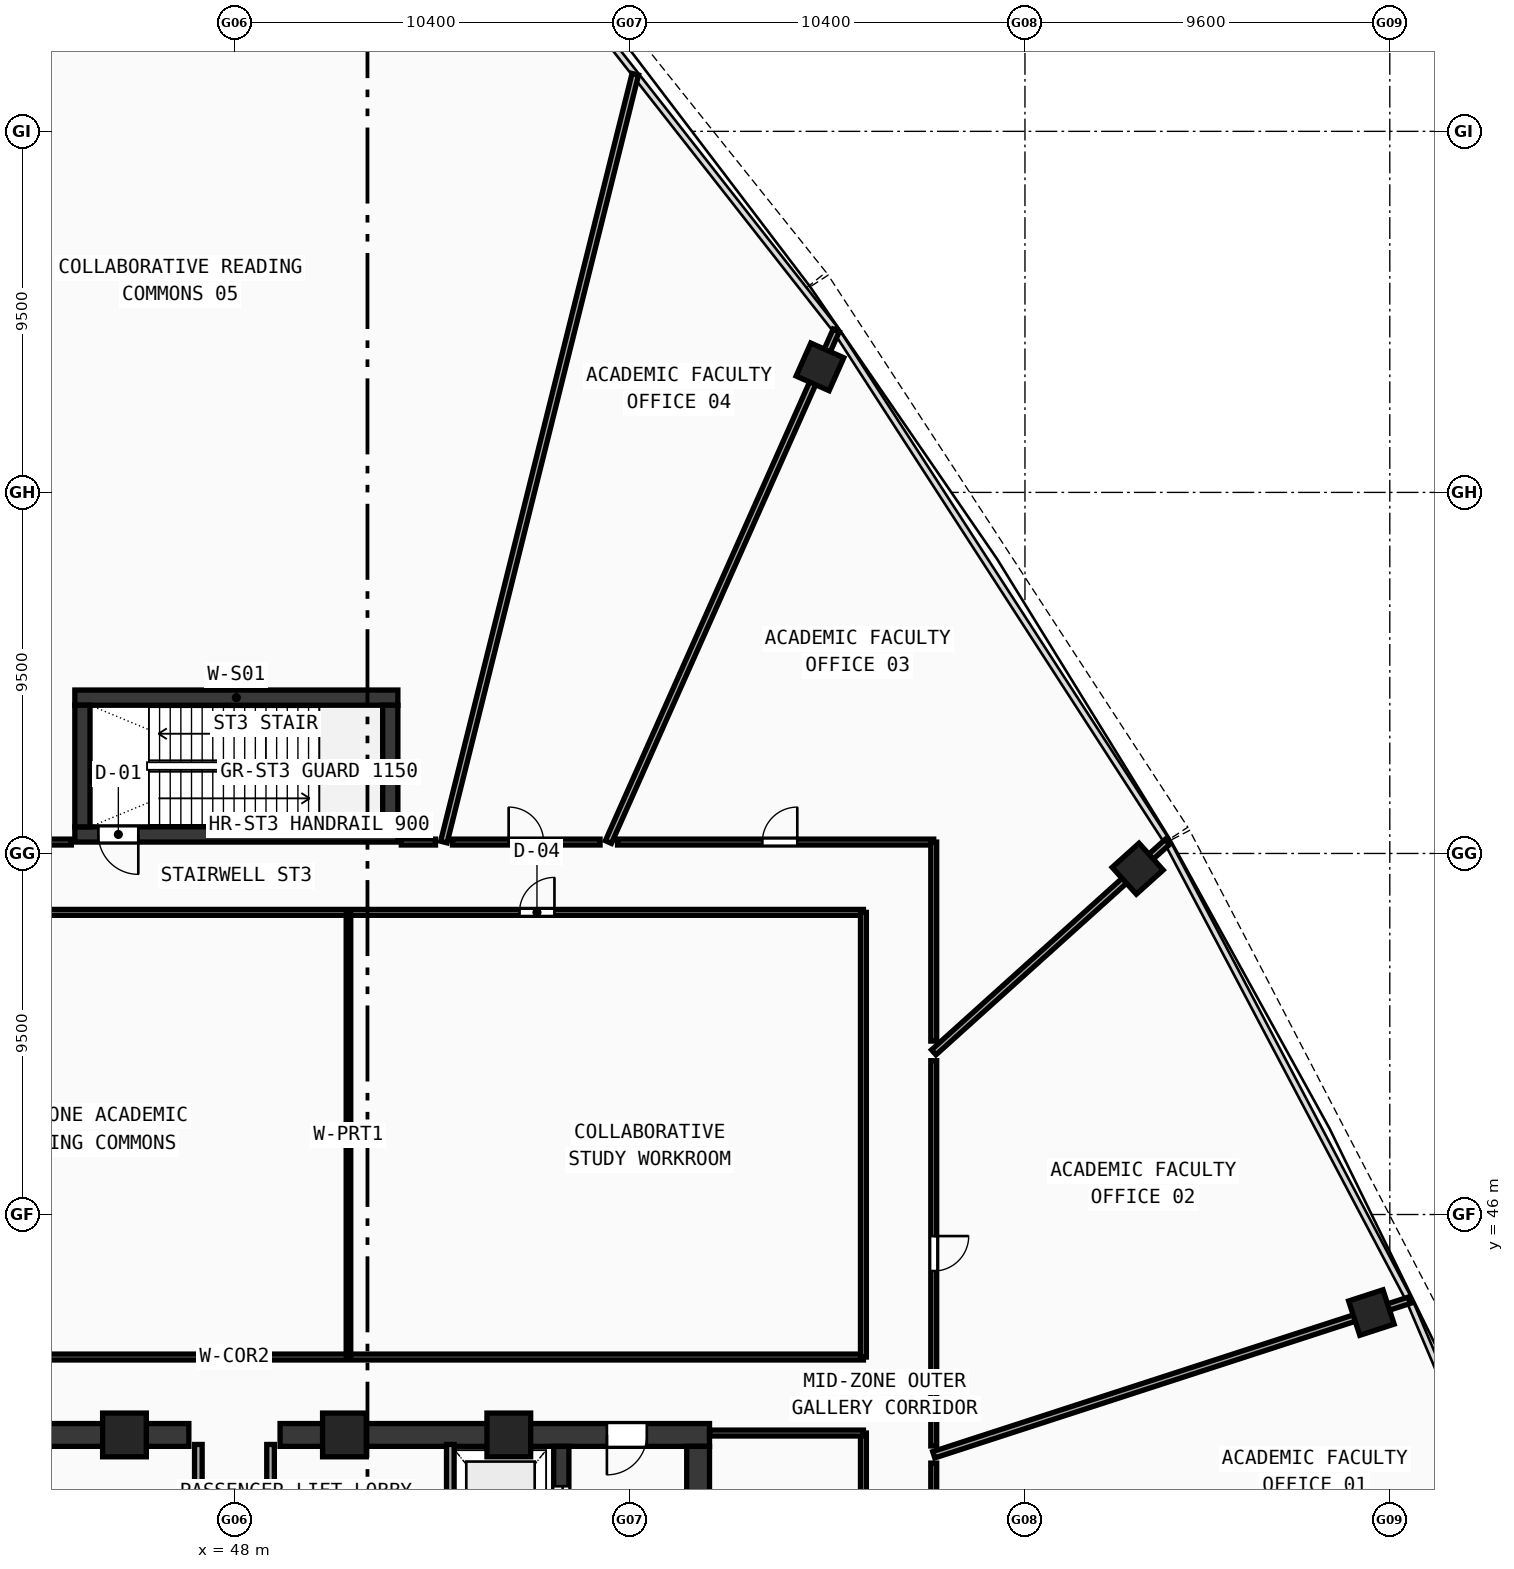
"""IFC4 building model, lengths in metres.
Left out: names, types, materials, properties, quantities, classifications, styles, units other than length and angle.
Written with IfcOpenShell. Run it as: python <this file> out.ifc"""

import sys

from ifc_helpers import new_model, si_unit, direction, frame, frame_2d, origin, origin_with_axes, origin_2d, place, context, subcontext, project, spatial, rectangle, hollow_rectangle, extrude, source, transform, mapped, element, fill, save


model = new_model("IFC4")
c1 = context("Model", 3, precision=1e-05, world=origin(), true_north=direction((0.0, 1.0)))
c2 = subcontext(c1, "Body", "Model", "MODEL_VIEW")
j1 = project(units=[si_unit("LENGTHUNIT", "METRE"), si_unit("PLANEANGLEUNIT", "RADIAN")], contexts=[c1])
p1 = place(None, origin())
s1 = spatial("IfcSite", under=j1, at=p1, CompositionType="ELEMENT")
p2 = place(p1, origin())
s2 = spatial("IfcBuilding", under=s1, at=p2, CompositionType="ELEMENT")
p3 = place(p2, frame((0.0, 0.0, 170.31)))
s3 = spatial("IfcBuildingStorey", under=s2, at=p3, CompositionType="ELEMENT", Elevation=170.31)
p4 = place(p3, frame((35.5, 40.2, 0.0), z_axis=(0.0, 0.0, 1.0), x_axis=(1.0, 0.0, 0.0)))
e1 = element("IfcWall", 1, at=p4, inside=s3, PredefinedType="SHEAR", context=c2, shape_type="SweptSolid", body=[
    extrude(rectangle(XDim=11.3, YDim=0.6, at=frame_2d((5.65, 0.0))), origin(), (0.0, 0.0, 1.0), 5.57),
])
p5 = place(p4, frame((1.65, 0.0, 0.0)))
e2 = element("IfcOpeningElement", 2, at=p5, cuts=e1, PredefinedType="OPENING", context=c2, shape_type="SweptSolid", body=[
    extrude(rectangle(XDim=1.05, YDim=2.1, at=frame_2d((0.525, 1.05))), frame((0.0, 0.31, 0.0), z_axis=(0.0, -1.0, 0.0), x_axis=(1.0, 0.0, 0.0)), (0.0, 0.0, 1.0), 0.62),
])
p6 = place(p3, frame((49.2, 40.2, 0.0), z_axis=(0.0, 0.0, 1.0), x_axis=(1.0, 0.0, 0.0)))
e3 = element("IfcWall", 3, at=p6, inside=s3, PredefinedType="SHEAR", context=c2, shape_type="SweptSolid", body=[
    extrude(rectangle(XDim=11.3, YDim=0.6, at=frame_2d((5.65, 0.0))), origin(), (0.0, 0.0, 1.0), 5.57),
])
p7 = place(p6, frame((8.6, 0.0, 0.0)))
e4 = element("IfcOpeningElement", 4, at=p7, cuts=e3, PredefinedType="OPENING", context=c2, shape_type="SweptSolid", body=[
    extrude(rectangle(XDim=1.05, YDim=2.1, at=frame_2d((0.525, 1.05))), frame((0.0, 0.31, 0.0), z_axis=(0.0, -1.0, 0.0), x_axis=(1.0, 0.0, 0.0)), (0.0, 0.0, 1.0), 0.62),
])
p8 = place(p3, frame((60.2, 27.8, 0.0), z_axis=(0.0, 0.0, 1.0), x_axis=(0.0, 1.0, 0.0)))
e5 = element("IfcWall", 5, at=p8, inside=s3, PredefinedType="SHEAR", context=c2, shape_type="SweptSolid", body=[
    extrude(rectangle(XDim=12.1, YDim=0.6, at=frame_2d((6.05, 0.0))), origin(), (0.0, 0.0, 1.0), 5.57),
])
p9 = place(p3, frame((56.6, 27.8, 0.0), z_axis=(0.0, 0.0, 1.0), x_axis=(0.0, 1.0, 0.0)))
e6 = element("IfcWall", 6, at=p9, inside=s3, PredefinedType="SHEAR", context=c2, shape_type="SweptSolid", body=[
    extrude(rectangle(XDim=12.1, YDim=0.4, at=frame_2d((6.05, 0.0))), origin(), (0.0, 0.0, 1.0), 5.57),
])
p10 = place(p9, frame((9.95, 0.0, 0.0)))
e7 = element("IfcOpeningElement", 7, at=p10, cuts=e6, PredefinedType="OPENING", context=c2, shape_type="SweptSolid", body=[
    extrude(rectangle(XDim=1.1, YDim=2.1, at=frame_2d((0.55, 1.05))), frame((0.0, 0.21, 0.0), z_axis=(0.0, -1.0, 0.0), x_axis=(1.0, 0.0, 0.0)), (0.0, 0.0, 1.0), 0.42),
])
p11 = place(p3, frame((43.8, 59.6, 0.0), z_axis=(0.0, 0.0, 1.0), x_axis=(1.0, 0.0, 0.0)))
e8 = element("IfcWall", 8, at=p11, inside=s3, PredefinedType="SHEAR", context=c2, shape_type="SweptSolid", body=[
    extrude(rectangle(XDim=8.5, YDim=0.4, at=frame_2d((4.25, 0.0))), origin(), (0.0, 0.0, 1.0), 5.57),
])
p12 = place(p3, frame((43.8, 56.0, 0.0), z_axis=(0.0, 0.0, 1.0), x_axis=(1.0, 0.0, 0.0)))
e9 = element("IfcWall", 9, at=p12, inside=s3, PredefinedType="SHEAR", context=c2, shape_type="SweptSolid", body=[
    extrude(rectangle(XDim=8.5, YDim=0.4, at=frame_2d((4.25, 0.0))), origin(), (0.0, 0.0, 1.0), 5.57),
])
p13 = place(p12, frame((0.62, 0.0, 0.0)))
e10 = element("IfcOpeningElement", 10, at=p13, cuts=e9, PredefinedType="OPENING", context=c2, shape_type="SweptSolid", body=[
    extrude(rectangle(XDim=1.05, YDim=2.1, at=frame_2d((0.525, 1.05))), frame((0.0, 0.21, 0.0), z_axis=(0.0, -1.0, 0.0), x_axis=(1.0, 0.0, 0.0)), (0.0, 0.0, 1.0), 0.42),
])
for number, where, z_axis, x_axis in (
    (11, (44.0, 56.2, 0.0), (0.0, 0.0, 1.0), (0.0, 1.0, 0.0)),
    (12, (52.1, 56.2, 0.0), (0.0, 0.0, 1.0), (0.0, 1.0, 0.0)),
):
    element("IfcWall", number, at=place(p3, frame(where, z_axis=z_axis, x_axis=x_axis)), inside=s3, PredefinedType="SHEAR", context=c2, shape_type="SweptSolid", body=[
        extrude(rectangle(XDim=3.2, YDim=0.4, at=frame_2d((1.6, 0.0))), origin(), (0.0, 0.0, 1.0), 5.57),
    ])
m1 = source(origin(), c2, "Body", "SweptSolid", [
    extrude(hollow_rectangle(XDim=1.15, YDim=1.15, WallThickness=0.048, at=origin_2d()), origin(), (0.0, 0.0, 1.0), 5.83),
])
for number, where, z_axis, x_axis in (
    (13, (55.219, 40.2, -0.26), (0.0, 0.0, 1.0), (1.0, 0.0, 0.0)),
    (14, (50.894, 40.2, -0.26), (0.0, 0.0, 1.0), (1.0, 0.0, 0.0)),
    (15, (45.106, 40.2, -0.26), (0.0, 0.0, 1.0), (1.0, 0.0, 0.0)),
):
    element("IfcColumn", number, at=place(p3, frame(where, z_axis=z_axis, x_axis=x_axis)), inside=s3, PredefinedType="COLUMN", context=c2, shape_type="MappedRepresentation", body=[
        mapped(m1, transform((0.0, 0.0, 0.0), scale=1.0)),
    ])
m2 = source(origin(), c2, "Body", "SweptSolid", [
    extrude(hollow_rectangle(XDim=0.95, YDim=0.95, WallThickness=0.04, at=origin_2d()), origin(), (0.0, 0.0, 1.0), 5.83),
])
for number, where, z_axis, x_axis in (
    (16, (77.915, 43.42, -0.26), (0.0, 0.0, 1.0), (-0.309, 0.951, 0.0)),
    (17, (71.766, 55.099, -0.26), (0.0, 0.0, 1.0), (-0.669, 0.743, 0.0)),
    (18, (63.406, 68.303, -0.26), (0.0, 0.0, 1.0), (-0.914, 0.407, 0.0)),
):
    element("IfcColumn", number, at=place(p3, frame(where, z_axis=z_axis, x_axis=x_axis)), inside=s3, PredefinedType="COLUMN", context=c2, shape_type="MappedRepresentation", body=[
        mapped(m2, transform((0.0, 0.0, 0.0), scale=1.0)),
    ])
p14 = place(p3, frame((53.68, 36.65, 0.0), z_axis=(0.0, 0.0, 1.0), x_axis=(0.0, 1.0, 0.0)))
e19 = element("IfcWall", 19, at=p14, inside=s3, PredefinedType="SOLIDWALL", context=c2, shape_type="SweptSolid", body=[
    extrude(rectangle(XDim=3.3, YDim=0.2, at=frame_2d((1.65, 0.0))), origin(), (0.0, 0.0, 1.0), 5.57),
])
for number, where, z_axis, x_axis in (
    (20, (47.05, 37.32, 0.0), (0.0, 0.0, 1.0), (0.0, 1.0, 0.0)),
    (21, (48.95, 37.32, 0.0), (0.0, 0.0, 1.0), (0.0, 1.0, 0.0)),
):
    element("IfcWall", number, at=place(p3, frame(where, z_axis=z_axis, x_axis=x_axis)), inside=s3, PredefinedType="SOLIDWALL", context=c2, shape_type="SweptSolid", body=[
        extrude(rectangle(XDim=2.63, YDim=0.2, at=frame_2d((1.315, 0.0))), origin(), (0.0, 0.0, 1.0), 5.57),
    ])
p15 = place(p3, frame((31.45, 42.25, 0.0), z_axis=(0.0, 0.0, 1.0), x_axis=(1.0, 0.0, 0.0)))
e22 = element("IfcWall", 22, at=p15, inside=s3, PredefinedType="PARTITIONING", context=c2, shape_type="SweptSolid", body=[
    extrude(rectangle(XDim=33.1, YDim=0.155, at=frame_2d((16.55, 0.0))), origin(), (0.0, 0.0, 1.0), 2.22),
])
p16 = place(p3, frame((31.45, 53.95, 0.0), z_axis=(0.0, 0.0, 1.0), x_axis=(1.0, 0.0, 0.0)))
e23 = element("IfcWall", 23, at=p16, inside=s3, PredefinedType="PARTITIONING", context=c2, shape_type="SweptSolid", body=[
    extrude(rectangle(XDim=33.1, YDim=0.155, at=frame_2d((16.55, 0.0))), origin(), (0.0, 0.0, 1.0), 2.22),
])
p17 = place(p16, frame((8.0, 0.0, 0.0)))
e24 = element("IfcOpeningElement", 24, at=p17, cuts=e23, PredefinedType="OPENING", context=c2, shape_type="SweptSolid", body=[
    extrude(rectangle(XDim=0.92, YDim=2.1, at=frame_2d((0.46, 1.05))), frame((0.0, 0.087, 0.0), z_axis=(0.0, -1.0, 0.0), x_axis=(1.0, 0.0, 0.0)), (0.0, 0.0, 1.0), 0.175),
])
p18 = place(p16, frame((24.05, 0.0, 0.0)))
e25 = element("IfcOpeningElement", 25, at=p18, cuts=e23, PredefinedType="OPENING", context=c2, shape_type="SweptSolid", body=[
    extrude(rectangle(XDim=0.92, YDim=2.1, at=frame_2d((0.46, 1.05))), frame((0.0, 0.087, 0.0), z_axis=(0.0, -1.0, 0.0), x_axis=(1.0, 0.0, 0.0)), (0.0, 0.0, 1.0), 0.175),
])
p19 = place(p3, frame((64.55, 42.25, 0.0), z_axis=(0.0, 0.0, 1.0), x_axis=(0.0, 1.0, 0.0)))
e26 = element("IfcWall", 26, at=p19, inside=s3, PredefinedType="PARTITIONING", context=c2, shape_type="SweptSolid", body=[
    extrude(rectangle(XDim=11.7, YDim=0.155, at=frame_2d((5.85, 0.0))), origin(), (0.0, 0.0, 1.0), 2.22),
])
p20 = place(p3, frame((51.0, 42.25, 0.0), z_axis=(0.0, 0.0, 1.0), x_axis=(0.0, 1.0, 0.0)))
e27 = element("IfcWall", 27, at=p20, inside=s3, PredefinedType="PARTITIONING", context=c2, shape_type="SweptSolid", body=[
    extrude(rectangle(XDim=11.7, YDim=0.12, at=frame_2d((5.85, 0.0))), origin(), (0.0, 0.0, 1.0), 5.17),
])
p21 = place(p3, frame((64.55, 23.65, 0.0), z_axis=(0.0, 0.0, 1.0), x_axis=(0.0, 1.0, 0.0)))
e28 = element("IfcWall", 28, at=p21, inside=s3, PredefinedType="PARTITIONING", context=c2, shape_type="SweptSolid", body=[
    extrude(rectangle(XDim=16.6, YDim=0.155, at=frame_2d((8.3, 0.0))), origin(), (0.0, 0.0, 1.0), 2.22),
])
p22 = place(p21, frame((7.5, 0.0, 0.0)))
e29 = element("IfcOpeningElement", 29, at=p22, cuts=e28, PredefinedType="OPENING", context=c2, shape_type="SweptSolid", body=[
    extrude(rectangle(XDim=0.9, YDim=2.08, at=frame_2d((0.45, 1.04))), frame((0.0, 0.087, 0.0), z_axis=(0.0, -1.0, 0.0), x_axis=(1.0, 0.0, 0.0)), (0.0, 0.0, 1.0), 0.175),
])
p23 = place(p3, frame((60.5, 40.25, 0.0), z_axis=(0.0, 0.0, 1.0), x_axis=(1.0, 0.0, 0.0)))
e30 = element("IfcWall", 30, at=p23, inside=s3, PredefinedType="PARTITIONING", context=c2, shape_type="SweptSolid", body=[
    extrude(rectangle(XDim=4.05, YDim=0.155, at=frame_2d((2.025, 0.0))), origin(), (0.0, 0.0, 1.0), 5.57),
])
p24 = place(p3, frame((66.4, 39.678, 0.0), z_axis=(0.0, 0.0, 1.0), x_axis=(0.951058745875, 0.309010132349, 0.0)))
e31 = element("IfcWall", 31, at=p24, inside=s3, PredefinedType="PARTITIONING", context=c2, shape_type="SweptSolid", body=[
    extrude(rectangle(XDim=13.158, YDim=0.175, at=frame_2d((6.579, 0.0))), origin(), (0.0, 0.0, 1.0), 2.22),
])
p25 = place(p3, frame((66.4, 50.267, 0.0), z_axis=(0.0, 0.0, 1.0), x_axis=(0.743138546471, 0.669137579836, 0.0)))
e32 = element("IfcWall", 32, at=p25, inside=s3, PredefinedType="PARTITIONING", context=c2, shape_type="SweptSolid", body=[
    extrude(rectangle(XDim=8.271, YDim=0.175, at=frame_2d((4.135, 0.0))), origin(), (0.0, 0.0, 1.0), 2.22),
])
p26 = place(p3, frame((57.84, 55.8, 0.0), z_axis=(0.0, 0.0, 1.0), x_axis=(0.406737891531, 0.913544901793, 0.0)))
e33 = element("IfcWall", 33, at=p26, inside=s3, PredefinedType="PARTITIONING", context=c2, shape_type="SweptSolid", body=[
    extrude(rectangle(XDim=14.736, YDim=0.175, at=frame_2d((7.368, 0.0))), origin(), (0.0, 0.0, 1.0), 2.22),
])
p27 = place(p3, frame((53.51, 55.8, 0.0), z_axis=(0.0, 0.0, 1.0), x_axis=(0.241934095485, 0.970292684422, 0.0)))
e34 = element("IfcWall", 34, at=p27, inside=s3, PredefinedType="PARTITIONING", context=c2, shape_type="SweptSolid", body=[
    extrude(rectangle(XDim=20.82, YDim=0.175, at=frame_2d((10.41, 0.0))), origin(), (0.0, 0.0, 1.0), 4.92),
])
p28 = place(p3, frame((38.38, 55.8, 0.0), z_axis=(0.0, 0.0, 1.0), x_axis=(1.0, 0.0, 0.0)))
e35 = element("IfcWall", 35, at=p28, inside=s3, PredefinedType="PARTITIONING", context=c2, shape_type="SweptSolid", body=[
    extrude(rectangle(XDim=5.329, YDim=0.155, at=frame_2d((2.665, 0.0))), origin(), (0.0, 0.0, 1.0), 2.22),
])
p29 = place(p28, frame((2.115, 0.0, 0.0)))
e36 = element("IfcOpeningElement", 36, at=p29, cuts=e35, PredefinedType="OPENING", context=c2, shape_type="SweptSolid", body=[
    extrude(rectangle(XDim=0.96, YDim=2.12, at=frame_2d((0.48, 1.06))), frame((0.0, 0.087, 0.0), z_axis=(0.0, -1.0, 0.0), x_axis=(1.0, 0.0, 0.0)), (0.0, 0.0, 1.0), 0.175),
])
p30 = place(p3, frame((52.391, 55.8, 0.0), z_axis=(0.0, 0.0, 1.0), x_axis=(1.0, 0.0, 0.0)))
e37 = element("IfcWall", 37, at=p30, inside=s3, PredefinedType="PARTITIONING", context=c2, shape_type="SweptSolid", body=[
    extrude(rectangle(XDim=0.899, YDim=0.155, at=frame_2d((0.45, 0.0))), origin(), (0.0, 0.0, 1.0), 5.57),
])
p31 = place(p3, frame((53.737, 55.8, 0.0), z_axis=(0.0, 0.0, 1.0), x_axis=(1.0, 0.0, 0.0)))
e38 = element("IfcWall", 38, at=p31, inside=s3, PredefinedType="PARTITIONING", context=c2, shape_type="SweptSolid", body=[
    extrude(rectangle(XDim=3.883, YDim=0.155, at=frame_2d((1.941, 0.0))), origin(), (0.0, 0.0, 1.0), 2.22),
])
p32 = place(p31, frame((1.478, 0.0, 0.0)))
e39 = element("IfcOpeningElement", 39, at=p32, cuts=e38, PredefinedType="OPENING", context=c2, shape_type="SweptSolid", body=[
    extrude(rectangle(XDim=0.92, YDim=2.1, at=frame_2d((0.46, 1.05))), frame((0.0, 0.087, 0.0), z_axis=(0.0, -1.0, 0.0), x_axis=(1.0, 0.0, 0.0)), (0.0, 0.0, 1.0), 0.175),
])
p33 = place(p3, frame((58.08, 55.8, 0.0), z_axis=(0.0, 0.0, 1.0), x_axis=(1.0, 0.0, 0.0)))
e40 = element("IfcWall", 40, at=p33, inside=s3, PredefinedType="PARTITIONING", context=c2, shape_type="SweptSolid", body=[
    extrude(rectangle(XDim=8.32, YDim=0.155, at=frame_2d((4.16, 0.0))), origin(), (0.0, 0.0, 1.0), 2.22),
])
p34 = place(p33, frame((3.809, 0.0, 0.0)))
e41 = element("IfcOpeningElement", 41, at=p34, cuts=e40, PredefinedType="OPENING", context=c2, shape_type="SweptSolid", body=[
    extrude(rectangle(XDim=0.92, YDim=2.1, at=frame_2d((0.46, 1.05))), frame((0.0, 0.087, 0.0), z_axis=(0.0, -1.0, 0.0), x_axis=(1.0, 0.0, 0.0)), (0.0, 0.0, 1.0), 0.175),
])
p35 = place(p3, frame((66.4, 55.8, 0.0), z_axis=(0.0, 0.0, 1.0), x_axis=(0.0, -1.0, 0.0)))
e42 = element("IfcWall", 42, at=p35, inside=s3, PredefinedType="PARTITIONING", context=c2, shape_type="SweptSolid", body=[
    extrude(rectangle(XDim=5.237, YDim=0.155, at=frame_2d((2.618, 0.0))), origin(), (0.0, 0.0, 1.0), 2.22),
])
p36 = place(p3, frame((66.4, 50.048, 0.0), z_axis=(0.0, 0.0, 1.0), x_axis=(0.0, -1.0, 0.0)))
e43 = element("IfcWall", 43, at=p36, inside=s3, PredefinedType="PARTITIONING", context=c2, shape_type="SweptSolid", body=[
    extrude(rectangle(XDim=10.138, YDim=0.155, at=frame_2d((5.069, 0.0))), origin(), (0.0, 0.0, 1.0), 2.22),
])
p37 = place(p36, frame((4.615, 0.0, 0.0)))
e44 = element("IfcOpeningElement", 44, at=p37, cuts=e43, PredefinedType="OPENING", context=c2, shape_type="SweptSolid", body=[
    extrude(rectangle(XDim=0.92, YDim=2.1, at=frame_2d((0.46, 1.05))), frame((0.0, 0.087, 0.0), z_axis=(0.0, -1.0, 0.0), x_axis=(1.0, 0.0, 0.0)), (0.0, 0.0, 1.0), 0.175),
])
p38 = place(p3, frame((66.4, 39.459, 0.0), z_axis=(0.0, 0.0, 1.0), x_axis=(0.0, -1.0, 0.0)))
e45 = element("IfcWall", 45, at=p38, inside=s3, PredefinedType="PARTITIONING", context=c2, shape_type="SweptSolid", body=[
    extrude(rectangle(XDim=4.251, YDim=0.155, at=frame_2d((2.126, 0.0))), origin(), (0.0, 0.0, 1.0), 2.22),
])
p39 = place(p38, frame((1.666, 0.0, 0.0)))
e46 = element("IfcOpeningElement", 46, at=p39, cuts=e45, PredefinedType="OPENING", context=c2, shape_type="SweptSolid", body=[
    extrude(rectangle(XDim=0.92, YDim=2.1, at=frame_2d((0.46, 1.05))), frame((0.0, 0.087, 0.0), z_axis=(0.0, -1.0, 0.0), x_axis=(1.0, 0.0, 0.0)), (0.0, 0.0, 1.0), 0.175),
])
m3 = source(origin(), c2, "Body", "SweptSolid", [
    extrude(rectangle(XDim=1.05, YDim=2.1, at=frame_2d((0.525, 1.05))), frame((0.0, 0.025, 0.0), z_axis=(0.0, -1.0, 0.0), x_axis=(1.0, 0.0, 0.0)), (0.0, 0.0, 1.0), 0.05),
])
p40 = place(p7, frame((1.05, 0.0, 0.0), z_axis=(0.0, 0.0, 1.0), x_axis=(-1.0, 0.0, 0.0)))
e47 = element("IfcDoor", 47, at=p40, inside=s3, OperationType="SINGLE_SWING_RIGHT", PredefinedType="DOOR", context=c2, shape_type="MappedRepresentation", body=[
    mapped(m3, transform((0.0, 0.0, 0.0), scale=1.0)),
])
fill(e4, e47)
m4 = source(origin(), c2, "Body", "SweptSolid", [
    extrude(rectangle(XDim=1.1, YDim=2.1, at=frame_2d((0.55, 1.05))), frame((0.0, 0.025, 0.0), z_axis=(0.0, -1.0, 0.0), x_axis=(1.0, 0.0, 0.0)), (0.0, 0.0, 1.0), 0.05),
])
p41 = place(p10, origin_with_axes())
e48 = element("IfcDoor", 48, at=p41, inside=s3, OperationType="DOUBLE_DOOR_SLIDING", PredefinedType="DOOR", context=c2, shape_type="MappedRepresentation", body=[
    mapped(m4, transform((0.0, 0.0, 0.0), scale=1.0)),
])
fill(e7, e48)
p42 = place(p13, frame((1.05, 0.0, 0.0), z_axis=(0.0, 0.0, 1.0), x_axis=(-1.0, 0.0, 0.0)))
e49 = element("IfcDoor", 49, at=p42, inside=s3, OperationType="SINGLE_SWING_LEFT", PredefinedType="DOOR", context=c2, shape_type="MappedRepresentation", body=[
    mapped(m3, transform((0.0, 0.0, 0.0), scale=1.0)),
])
fill(e10, e49)
m5 = source(origin(), c2, "Body", "SweptSolid", [
    extrude(rectangle(XDim=0.92, YDim=2.1, at=frame_2d((0.46, 1.05))), frame((0.0, 0.025, 0.0), z_axis=(0.0, -1.0, 0.0), x_axis=(1.0, 0.0, 0.0)), (0.0, 0.0, 1.0), 0.05),
])
p43 = place(p18, origin_with_axes())
e50 = element("IfcDoor", 50, at=p43, inside=s3, OperationType="SINGLE_SWING_RIGHT", PredefinedType="DOOR", context=c2, shape_type="MappedRepresentation", body=[
    mapped(m5, transform((0.0, 0.0, 0.0), scale=1.0)),
])
fill(e25, e50)
p44 = place(p37, origin_with_axes())
e51 = element("IfcDoor", 51, at=p44, inside=s3, OperationType="SINGLE_SWING_LEFT", PredefinedType="DOOR", context=c2, shape_type="MappedRepresentation", body=[
    mapped(m5, transform((0.0, 0.0, 0.0), scale=1.0)),
])
fill(e44, e51)
p45 = place(p34, origin_with_axes())
e52 = element("IfcDoor", 52, at=p45, inside=s3, OperationType="SINGLE_SWING_RIGHT", PredefinedType="DOOR", context=c2, shape_type="MappedRepresentation", body=[
    mapped(m5, transform((0.0, 0.0, 0.0), scale=1.0)),
])
fill(e41, e52)
p46 = place(p32, origin_with_axes())
e53 = element("IfcDoor", 53, at=p46, inside=s3, OperationType="SINGLE_SWING_LEFT", PredefinedType="DOOR", context=c2, shape_type="MappedRepresentation", body=[
    mapped(m5, transform((0.0, 0.0, 0.0), scale=1.0)),
])
fill(e39, e53)
save(model, sys.argv[1])
